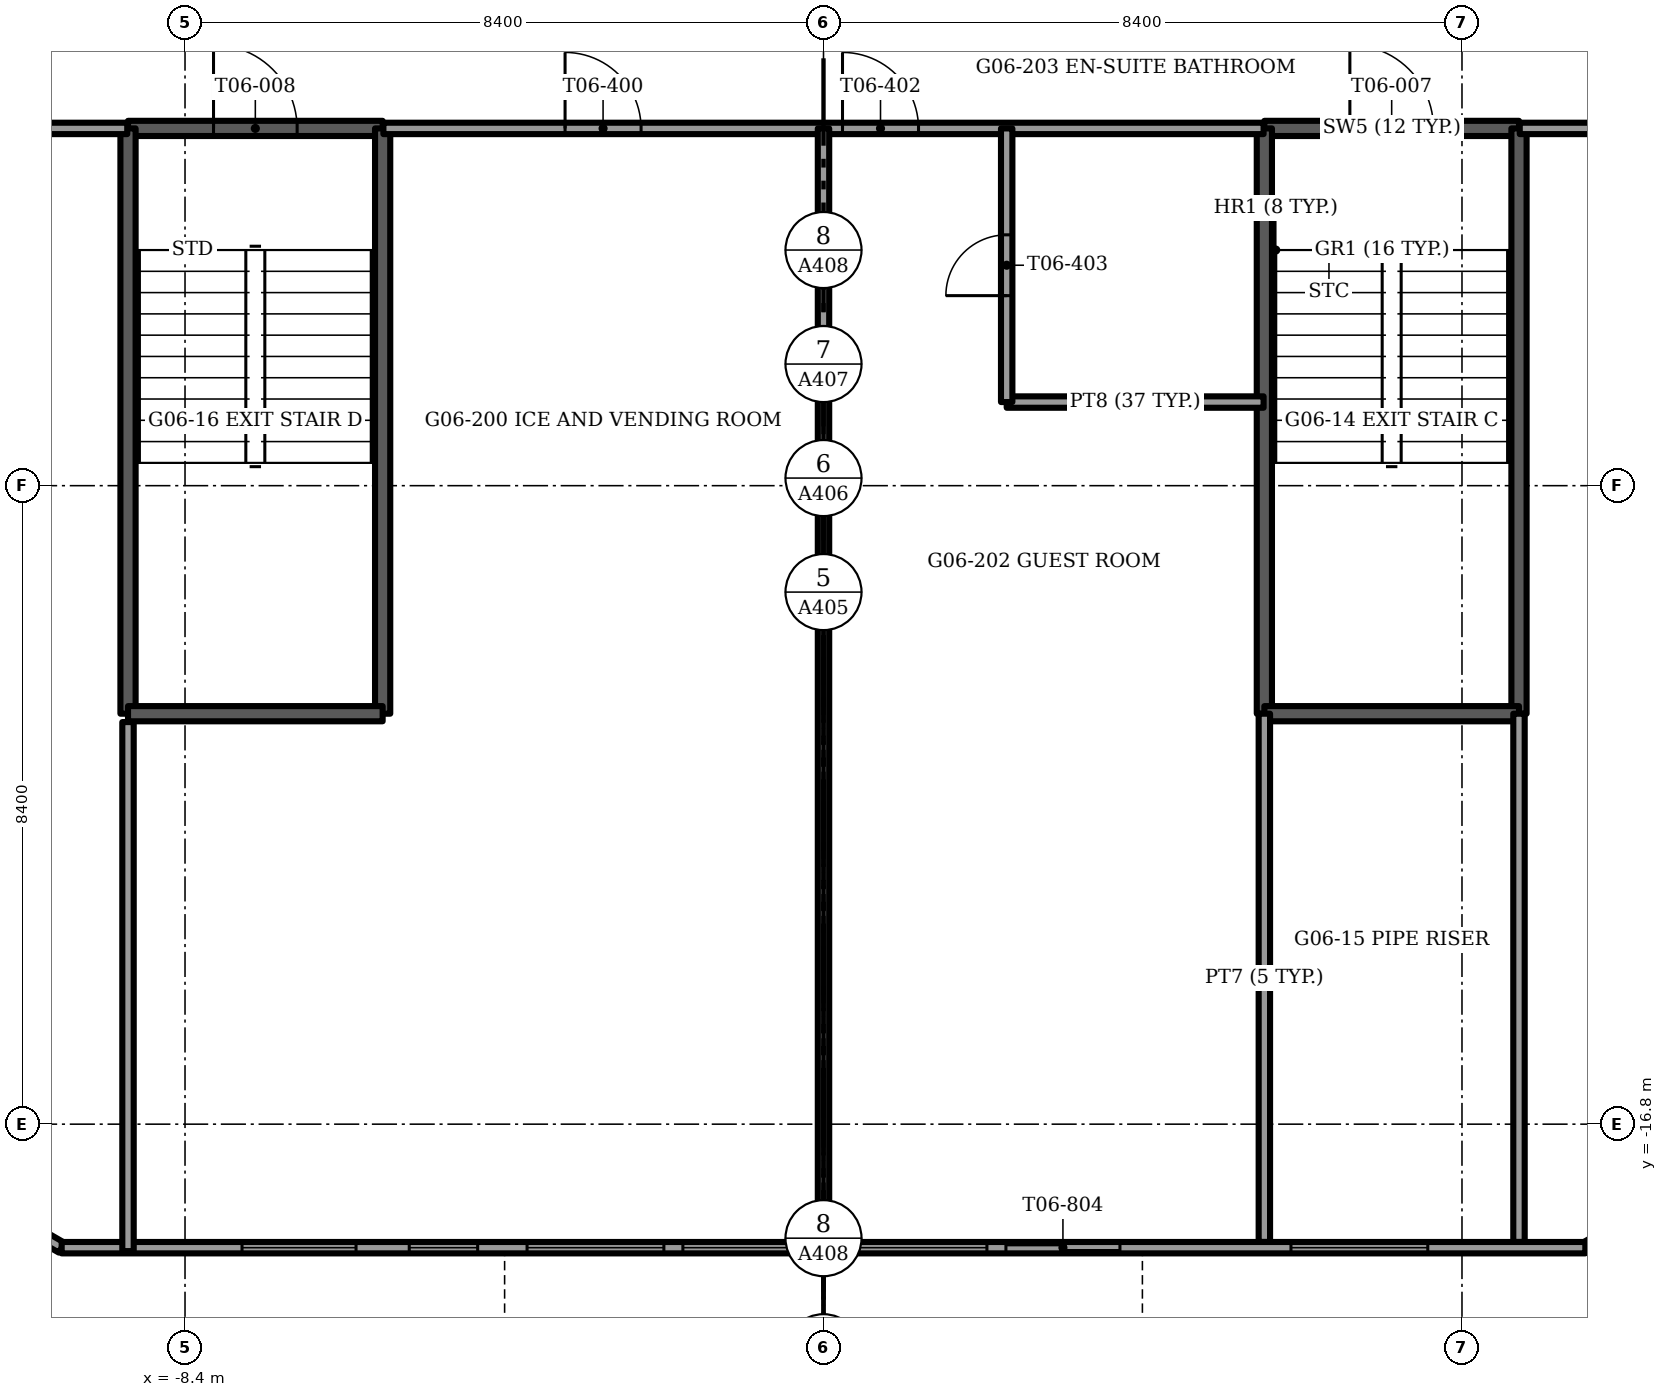
"""IFC4 building model, lengths in metres.
Left out: names, types, materials, properties, quantities, classifications, styles, units other than length and angle.
Written with IfcOpenShell. Run it as: python <this file> out.ifc"""

import sys

from ifc_helpers import new_model, si_unit, direction, frame, frame_2d, origin, place, context, subcontext, project, spatial, rectangle, extrude, element, fill, save


model = new_model("IFC4")
c1 = context("Model", 3, precision=1e-05, world=origin(), true_north=direction((0.0, 1.0)))
c2 = subcontext(c1, "Body", "Model", "MODEL_VIEW")
j1 = project(units=[si_unit("LENGTHUNIT", "METRE"), si_unit("PLANEANGLEUNIT", "RADIAN")], contexts=[c1])
p1 = place(None, origin())
s1 = spatial("IfcSite", under=j1, at=p1, CompositionType="ELEMENT")
p2 = place(p1, origin())
s2 = spatial("IfcBuilding", under=s1, at=p2, CompositionType="ELEMENT")
p3 = place(p2, frame((0.0, 0.0, 28.0)))
s3 = spatial("IfcBuildingStorey", under=s2, at=p3, CompositionType="ELEMENT", Elevation=28.0)
p4 = place(p3, frame((-10.023, -18.425, 0.0), z_axis=(0.0, 0.0, 1.0), x_axis=(1.0, 0.0, 0.0)))
e1 = element("IfcWall", 1, at=p4, inside=s3, PredefinedType="SOLIDWALL", context=c2, shape_type="SweptSolid", body=[
    extrude(rectangle(XDim=20.045, YDim=0.15, at=frame_2d((10.023, 0.0))), origin(), (0.0, 0.0, 1.0), 3.45),
])
p5 = place(p4, frame((4.573, 0.0, 0.15)))
e2 = element("IfcOpeningElement", 2, at=p5, cuts=e1, PredefinedType="OPENING", context=c2, shape_type="SweptSolid", body=[
    extrude(rectangle(XDim=0.9, YDim=2.85, at=frame_2d((0.45, 1.425))), frame((0.0, 0.075, 0.0), z_axis=(0.0, -1.0, 0.0), x_axis=(1.0, 0.0, 0.0)), (0.0, 0.0, 1.0), 0.15),
])
p6 = place(p4, frame((2.373, 0.0, 0.15)))
e3 = element("IfcOpeningElement", 3, at=p6, cuts=e1, PredefinedType="OPENING", context=c2, shape_type="SweptSolid", body=[
    extrude(rectangle(XDim=1.5, YDim=2.85, at=frame_2d((0.75, 1.425))), frame((0.0, 0.075, 0.0), z_axis=(0.0, -1.0, 0.0), x_axis=(1.0, 0.0, 0.0)), (0.0, 0.0, 1.0), 0.15),
])
p7 = place(p4, frame((6.123, 0.0, 0.15)))
e4 = element("IfcOpeningElement", 4, at=p7, cuts=e1, PredefinedType="OPENING", context=c2, shape_type="SweptSolid", body=[
    extrude(rectangle(XDim=1.8, YDim=2.85, at=frame_2d((0.9, 1.425))), frame((0.0, 0.075, 0.0), z_axis=(0.0, -1.0, 0.0), x_axis=(1.0, 0.0, 0.0)), (0.0, 0.0, 1.0), 0.15),
])
p8 = place(p4, frame((8.173, 0.0, 0.15)))
e5 = element("IfcOpeningElement", 5, at=p8, cuts=e1, PredefinedType="OPENING", context=c2, shape_type="SweptSolid", body=[
    extrude(rectangle(XDim=1.5, YDim=2.85, at=frame_2d((0.75, 1.425))), frame((0.0, 0.075, 0.0), z_axis=(0.0, -1.0, 0.0), x_axis=(1.0, 0.0, 0.0)), (0.0, 0.0, 1.0), 0.15),
])
p9 = place(p4, frame((10.373, 0.0, 0.15)))
e6 = element("IfcOpeningElement", 6, at=p9, cuts=e1, PredefinedType="OPENING", context=c2, shape_type="SweptSolid", body=[
    extrude(rectangle(XDim=1.8, YDim=2.85, at=frame_2d((0.9, 1.425))), frame((0.0, 0.075, 0.0), z_axis=(0.0, -1.0, 0.0), x_axis=(1.0, 0.0, 0.0)), (0.0, 0.0, 1.0), 0.15),
])
p10 = place(p4, frame((12.423, 0.0, 0.0)))
e7 = element("IfcOpeningElement", 7, at=p10, cuts=e1, PredefinedType="OPENING", context=c2, shape_type="SweptSolid", body=[
    extrude(rectangle(XDim=1.5, YDim=2.4, at=frame_2d((0.75, 1.2))), frame((0.0, 0.075, 0.0), z_axis=(0.0, -1.0, 0.0), x_axis=(1.0, 0.0, 0.0)), (0.0, 0.0, 1.0), 0.15),
])
p11 = place(p4, frame((16.173, 0.0, 0.15)))
e8 = element("IfcOpeningElement", 8, at=p11, cuts=e1, PredefinedType="OPENING", context=c2, shape_type="SweptSolid", body=[
    extrude(rectangle(XDim=1.8, YDim=2.85, at=frame_2d((0.9, 1.425))), frame((0.0, 0.075, 0.0), z_axis=(0.0, -1.0, 0.0), x_axis=(1.0, 0.0, 0.0)), (0.0, 0.0, 1.0), 0.15),
])
p12 = place(p3, frame((-10.945, -17.893, 0.0), z_axis=(0.0, 0.0, 1.0), x_axis=(0.866048165231, -0.499960573946, 0.0)))
e9 = element("IfcWall", 9, at=p12, inside=s3, PredefinedType="SOLIDWALL", context=c2, shape_type="SweptSolid", body=[
    extrude(rectangle(XDim=1.065, YDim=0.15, at=frame_2d((0.532, 0.0))), origin(), (0.0, 0.0, 1.0), 3.45),
])
p13 = place(p12, frame((0.258, 0.0, 0.15)))
e10 = element("IfcOpeningElement", 10, at=p13, cuts=e9, PredefinedType="OPENING", context=c2, shape_type="SweptSolid", body=[
    extrude(rectangle(XDim=0.55, YDim=2.85, at=frame_2d((0.275, 1.425))), frame((0.0, 0.075, 0.0), z_axis=(0.0, -1.0, 0.0), x_axis=(1.0, 0.0, 0.0)), (0.0, 0.0, 1.0), 0.15),
])
p14 = place(p3, frame((10.023, -18.425, 0.0), z_axis=(0.0, 0.0, 1.0), x_axis=(0.866048165231, 0.499960573946, 0.0)))
e11 = element("IfcWall", 11, at=p14, inside=s3, PredefinedType="SOLIDWALL", context=c2, shape_type="SweptSolid", body=[
    extrude(rectangle(XDim=1.065, YDim=0.15, at=frame_2d((0.532, 0.0))), origin(), (0.0, 0.0, 1.0), 3.45),
])
p15 = place(p14, frame((0.258, 0.0, 0.15)))
e12 = element("IfcOpeningElement", 12, at=p15, cuts=e11, PredefinedType="OPENING", context=c2, shape_type="SweptSolid", body=[
    extrude(rectangle(XDim=0.55, YDim=2.85, at=frame_2d((0.275, 1.425))), frame((0.0, 0.075, 0.0), z_axis=(0.0, -1.0, 0.0), x_axis=(1.0, 0.0, 0.0)), (0.0, 0.0, 1.0), 0.15),
])
p16 = place(p3, frame((5.8, -3.7, -0.3), z_axis=(0.0, 0.0, 1.0), x_axis=(1.0, 0.0, 0.0)))
e13 = element("IfcWall", 13, at=p16, inside=s3, PredefinedType="SOLIDWALL", context=c2, shape_type="SweptSolid", body=[
    extrude(rectangle(XDim=3.35, YDim=0.2, at=frame_2d((1.675, 0.0))), origin(), (0.0, 0.0, 1.0), 3.75),
])
p17 = place(p16, frame((1.125, 0.0, 0.0)))
e14 = element("IfcOpeningElement", 14, at=p17, cuts=e13, PredefinedType="OPENING", context=c2, shape_type="SweptSolid", body=[
    extrude(rectangle(XDim=1.1, YDim=2.1, at=frame_2d((0.55, 1.05))), frame((0.0, 0.1, 0.0), z_axis=(0.0, -1.0, 0.0), x_axis=(1.0, 0.0, 0.0)), (0.0, 0.0, 1.0), 0.2),
])
for number, where, z_axis, x_axis in (
    (15, (5.8, -3.7, -0.3), (0.0, 0.0, 1.0), (0.0, -1.0, 0.0)),
    (16, (9.15, -3.7, -0.3), (0.0, 0.0, 1.0), (0.0, -1.0, 0.0)),
):
    element("IfcWall", number, at=place(p3, frame(where, z_axis=z_axis, x_axis=x_axis)), inside=s3, PredefinedType="SOLIDWALL", context=c2, shape_type="SweptSolid", body=[
        extrude(rectangle(XDim=7.7, YDim=0.2, at=frame_2d((3.85, 0.0))), origin(), (0.0, 0.0, 1.0), 3.75),
    ])
p18 = place(p3, frame((5.8, -11.4, -0.3), z_axis=(0.0, 0.0, 1.0), x_axis=(1.0, 0.0, 0.0)))
e17 = element("IfcWall", 17, at=p18, inside=s3, PredefinedType="SOLIDWALL", context=c2, shape_type="SweptSolid", body=[
    extrude(rectangle(XDim=3.35, YDim=0.2, at=frame_2d((1.675, 0.0))), origin(), (0.0, 0.0, 1.0), 3.75),
])
for number, where, z_axis, x_axis in (
    (18, (5.8, -11.4, 0.0), (0.0, 0.0, 1.0), (0.0, -1.0, 0.0)),
    (19, (9.15, -11.4, 0.0), (0.0, 0.0, 1.0), (0.0, -1.0, 0.0)),
):
    element("IfcWall", number, at=place(p3, frame(where, z_axis=z_axis, x_axis=x_axis)), inside=s3, PredefinedType="PARTITIONING", context=c2, shape_type="SweptSolid", body=[
        extrude(rectangle(XDim=6.95, YDim=0.15, at=frame_2d((3.475, 0.0))), origin(), (0.0, 0.0, 1.0), 3.45),
    ])
p19 = place(p3, frame((-9.15, -3.7, -0.3), z_axis=(0.0, 0.0, 1.0), x_axis=(1.0, 0.0, 0.0)))
e20 = element("IfcWall", 20, at=p19, inside=s3, PredefinedType="SOLIDWALL", context=c2, shape_type="SweptSolid", body=[
    extrude(rectangle(XDim=3.35, YDim=0.2, at=frame_2d((1.675, 0.0))), origin(), (0.0, 0.0, 1.0), 3.75),
])
p20 = place(p19, frame((1.125, 0.0, 0.0)))
e21 = element("IfcOpeningElement", 21, at=p20, cuts=e20, PredefinedType="OPENING", context=c2, shape_type="SweptSolid", body=[
    extrude(rectangle(XDim=1.1, YDim=2.1, at=frame_2d((0.55, 1.05))), frame((0.0, 0.1, 0.0), z_axis=(0.0, -1.0, 0.0), x_axis=(1.0, 0.0, 0.0)), (0.0, 0.0, 1.0), 0.2),
])
for number, where, z_axis, x_axis in (
    (22, (-9.15, -3.7, -0.3), (0.0, 0.0, 1.0), (0.0, -1.0, 0.0)),
    (23, (-5.8, -3.7, -0.3), (0.0, 0.0, 1.0), (0.0, -1.0, 0.0)),
):
    element("IfcWall", number, at=place(p3, frame(where, z_axis=z_axis, x_axis=x_axis)), inside=s3, PredefinedType="SOLIDWALL", context=c2, shape_type="SweptSolid", body=[
        extrude(rectangle(XDim=7.7, YDim=0.2, at=frame_2d((3.85, 0.0))), origin(), (0.0, 0.0, 1.0), 3.75),
    ])
p21 = place(p3, frame((-9.15, -11.4, -0.3), z_axis=(0.0, 0.0, 1.0), x_axis=(1.0, 0.0, 0.0)))
e24 = element("IfcWall", 24, at=p21, inside=s3, PredefinedType="SOLIDWALL", context=c2, shape_type="SweptSolid", body=[
    extrude(rectangle(XDim=3.35, YDim=0.2, at=frame_2d((1.675, 0.0))), origin(), (0.0, 0.0, 1.0), 3.75),
])
p22 = place(p3, frame((2.41, -7.3, 0.0), z_axis=(0.0, 0.0, 1.0), x_axis=(1.0, 0.0, 0.0)))
e25 = element("IfcWall", 25, at=p22, inside=s3, PredefinedType="PARTITIONING", context=c2, shape_type="SweptSolid", body=[
    extrude(rectangle(XDim=3.38, YDim=0.15, at=frame_2d((1.69, 0.0))), origin(), (0.0, 0.0, 1.0), 3.45),
])
p23 = place(p3, frame((-19.191, -3.7, 0.0), z_axis=(0.0, 0.0, 1.0), x_axis=(1.0, 0.0, 0.0)))
e26 = element("IfcWall", 26, at=p23, inside=s3, PredefinedType="PARTITIONING", context=c2, shape_type="SweptSolid", body=[
    extrude(rectangle(XDim=10.031, YDim=0.15, at=frame_2d((5.016, 0.0))), origin(), (0.0, 0.0, 1.0), 3.45),
])
p24 = place(p23, frame((7.191, 0.0, 0.0)))
e27 = element("IfcOpeningElement", 27, at=p24, cuts=e26, PredefinedType="OPENING", context=c2, shape_type="SweptSolid", body=[
    extrude(rectangle(XDim=1.0, YDim=2.1, at=frame_2d((0.5, 1.05))), frame((0.0, 0.075, 0.0), z_axis=(0.0, -1.0, 0.0), x_axis=(1.0, 0.0, 0.0)), (0.0, 0.0, 1.0), 0.15),
])
p25 = place(p3, frame((-5.79, -3.7, 0.0), z_axis=(0.0, 0.0, 1.0), x_axis=(1.0, 0.0, 0.0)))
e28 = element("IfcWall", 28, at=p25, inside=s3, PredefinedType="PARTITIONING", context=c2, shape_type="SweptSolid", body=[
    extrude(rectangle(XDim=11.58, YDim=0.15, at=frame_2d((5.79, 0.0))), origin(), (0.0, 0.0, 1.0), 3.45),
])
p26 = place(p25, frame((2.39, 0.0, 0.0)))
e29 = element("IfcOpeningElement", 29, at=p26, cuts=e28, PredefinedType="OPENING", context=c2, shape_type="SweptSolid", body=[
    extrude(rectangle(XDim=1.0, YDim=2.1, at=frame_2d((0.5, 1.05))), frame((0.0, 0.075, 0.0), z_axis=(0.0, -1.0, 0.0), x_axis=(1.0, 0.0, 0.0)), (0.0, 0.0, 1.0), 0.15),
])
p27 = place(p25, frame((6.04, 0.0, 0.0)))
e30 = element("IfcOpeningElement", 30, at=p27, cuts=e28, PredefinedType="OPENING", context=c2, shape_type="SweptSolid", body=[
    extrude(rectangle(XDim=1.0, YDim=2.1, at=frame_2d((0.5, 1.05))), frame((0.0, 0.075, 0.0), z_axis=(0.0, -1.0, 0.0), x_axis=(1.0, 0.0, 0.0)), (0.0, 0.0, 1.0), 0.15),
])
p28 = place(p3, frame((9.16, -3.7, 0.0), z_axis=(0.0, 0.0, 1.0), x_axis=(1.0, 0.0, 0.0)))
e31 = element("IfcWall", 31, at=p28, inside=s3, PredefinedType="PARTITIONING", context=c2, shape_type="SweptSolid", body=[
    extrude(rectangle(XDim=10.031, YDim=0.15, at=frame_2d((5.016, 0.0))), origin(), (0.0, 0.0, 1.0), 3.45),
])
p29 = place(p28, frame((1.84, 0.0, 0.0)))
e32 = element("IfcOpeningElement", 32, at=p29, cuts=e31, PredefinedType="OPENING", context=c2, shape_type="SweptSolid", body=[
    extrude(rectangle(XDim=1.0, YDim=2.1, at=frame_2d((0.5, 1.05))), frame((0.0, 0.075, 0.0), z_axis=(0.0, -1.0, 0.0), x_axis=(1.0, 0.0, 0.0)), (0.0, 0.0, 1.0), 0.15),
])
p30 = place(p3, frame((2.41, -7.3, 0.0), z_axis=(0.0, 0.0, 1.0), x_axis=(0.0, 1.0, 0.0)))
e33 = element("IfcWall", 33, at=p30, inside=s3, PredefinedType="PARTITIONING", context=c2, shape_type="SweptSolid", body=[
    extrude(rectangle(XDim=3.6, YDim=0.15, at=frame_2d((1.8, 0.0))), origin(), (0.0, 0.0, 1.0), 3.45),
])
p31 = place(p30, frame((1.4, 0.0, 0.0)))
e34 = element("IfcOpeningElement", 34, at=p31, cuts=e33, PredefinedType="OPENING", context=c2, shape_type="SweptSolid", body=[
    extrude(rectangle(XDim=0.8, YDim=2.1, at=frame_2d((0.4, 1.05))), frame((0.0, 0.075, 0.0), z_axis=(0.0, -1.0, 0.0), x_axis=(1.0, 0.0, 0.0)), (0.0, 0.0, 1.0), 0.15),
])
p32 = place(p3, frame((0.0, -18.47, 0.0), z_axis=(0.0, 0.0, 1.0), x_axis=(0.0, 1.0, 0.0)))
e35 = element("IfcWall", 35, at=p32, inside=s3, PredefinedType="PARTITIONING", context=c2, shape_type="SweptSolid", body=[
    extrude(rectangle(XDim=14.77, YDim=0.15, at=frame_2d((7.385, 0.0))), origin(), (0.0, 0.0, 1.0), 3.45),
])
p33 = place(p3, frame((-9.15, -18.47, 0.0), z_axis=(0.0, 0.0, 1.0), x_axis=(0.0, 1.0, 0.0)))
e36 = element("IfcWall", 36, at=p33, inside=s3, PredefinedType="PARTITIONING", context=c2, shape_type="SweptSolid", body=[
    extrude(rectangle(XDim=6.96, YDim=0.15, at=frame_2d((3.48, 0.0))), origin(), (0.0, 0.0, 1.0), 3.45),
])
p34 = place(p5, origin())
e37 = element("IfcWindow", 37, at=p34, inside=s3, PartitioningType="SINGLE_PANEL", PredefinedType="WINDOW", context=c2, shape_type="SweptSolid", body=[
    extrude(rectangle(XDim=0.9, YDim=2.85, at=frame_2d((0.45, 1.425))), frame((0.0, 0.03, 0.0), z_axis=(0.0, -1.0, 0.0), x_axis=(1.0, 0.0, 0.0)), (0.0, 0.0, 1.0), 0.06),
])
fill(e2, e37)
p35 = place(p6, origin())
e38 = element("IfcWindow", 38, at=p35, inside=s3, PartitioningType="SINGLE_PANEL", PredefinedType="WINDOW", context=c2, shape_type="SweptSolid", body=[
    extrude(rectangle(XDim=1.5, YDim=2.85, at=frame_2d((0.75, 1.425))), frame((0.0, 0.03, 0.0), z_axis=(0.0, -1.0, 0.0), x_axis=(1.0, 0.0, 0.0)), (0.0, 0.0, 1.0), 0.06),
])
fill(e3, e38)
p36 = place(p7, origin())
e39 = element("IfcWindow", 39, at=p36, inside=s3, PartitioningType="SINGLE_PANEL", PredefinedType="WINDOW", context=c2, shape_type="SweptSolid", body=[
    extrude(rectangle(XDim=1.8, YDim=2.85, at=frame_2d((0.9, 1.425))), frame((0.0, 0.03, 0.0), z_axis=(0.0, -1.0, 0.0), x_axis=(1.0, 0.0, 0.0)), (0.0, 0.0, 1.0), 0.06),
])
fill(e4, e39)
p37 = place(p8, origin())
e40 = element("IfcWindow", 40, at=p37, inside=s3, PartitioningType="SINGLE_PANEL", PredefinedType="WINDOW", context=c2, shape_type="SweptSolid", body=[
    extrude(rectangle(XDim=1.5, YDim=2.85, at=frame_2d((0.75, 1.425))), frame((0.0, 0.03, 0.0), z_axis=(0.0, -1.0, 0.0), x_axis=(1.0, 0.0, 0.0)), (0.0, 0.0, 1.0), 0.06),
])
fill(e5, e40)
p38 = place(p9, origin())
e41 = element("IfcWindow", 41, at=p38, inside=s3, PartitioningType="SINGLE_PANEL", PredefinedType="WINDOW", context=c2, shape_type="SweptSolid", body=[
    extrude(rectangle(XDim=1.8, YDim=2.85, at=frame_2d((0.9, 1.425))), frame((0.0, 0.03, 0.0), z_axis=(0.0, -1.0, 0.0), x_axis=(1.0, 0.0, 0.0)), (0.0, 0.0, 1.0), 0.06),
])
fill(e6, e41)
p39 = place(p10, origin())
e42 = element("IfcDoor", 42, at=p39, inside=s3, OperationType="SLIDING_TO_LEFT", PredefinedType="DOOR", context=c2, shape_type="SweptSolid", body=[
    extrude(rectangle(XDim=1.5, YDim=2.4, at=frame_2d((0.75, 1.2))), frame((0.0, 0.025, 0.0), z_axis=(0.0, -1.0, 0.0), x_axis=(1.0, 0.0, 0.0)), (0.0, 0.0, 1.0), 0.05),
])
fill(e7, e42)
p40 = place(p11, origin())
e43 = element("IfcWindow", 43, at=p40, inside=s3, PartitioningType="SINGLE_PANEL", PredefinedType="WINDOW", context=c2, shape_type="SweptSolid", body=[
    extrude(rectangle(XDim=1.8, YDim=2.85, at=frame_2d((0.9, 1.425))), frame((0.0, 0.03, 0.0), z_axis=(0.0, -1.0, 0.0), x_axis=(1.0, 0.0, 0.0)), (0.0, 0.0, 1.0), 0.06),
])
fill(e8, e43)
p41 = place(p17, origin())
e44 = element("IfcDoor", 44, at=p41, inside=s3, OperationType="SINGLE_SWING_LEFT", PredefinedType="DOOR", context=c2, shape_type="SweptSolid", body=[
    extrude(rectangle(XDim=1.1, YDim=2.1, at=frame_2d((0.55, 1.05))), frame((0.0, 0.025, 0.0), z_axis=(0.0, -1.0, 0.0), x_axis=(1.0, 0.0, 0.0)), (0.0, 0.0, 1.0), 0.05),
])
fill(e14, e44)
p42 = place(p20, origin())
e45 = element("IfcDoor", 45, at=p42, inside=s3, OperationType="SINGLE_SWING_LEFT", PredefinedType="DOOR", context=c2, shape_type="SweptSolid", body=[
    extrude(rectangle(XDim=1.1, YDim=2.1, at=frame_2d((0.55, 1.05))), frame((0.0, 0.025, 0.0), z_axis=(0.0, -1.0, 0.0), x_axis=(1.0, 0.0, 0.0)), (0.0, 0.0, 1.0), 0.05),
])
fill(e21, e45)
p43 = place(p26, origin())
e46 = element("IfcDoor", 46, at=p43, inside=s3, OperationType="SINGLE_SWING_RIGHT", PredefinedType="DOOR", context=c2, shape_type="SweptSolid", body=[
    extrude(rectangle(XDim=1.0, YDim=2.1, at=frame_2d((0.5, 1.05))), frame((0.0, 0.025, 0.0), z_axis=(0.0, -1.0, 0.0), x_axis=(1.0, 0.0, 0.0)), (0.0, 0.0, 1.0), 0.05),
])
fill(e29, e46)
p44 = place(p27, origin())
e47 = element("IfcDoor", 47, at=p44, inside=s3, OperationType="SINGLE_SWING_LEFT", PredefinedType="DOOR", context=c2, shape_type="SweptSolid", body=[
    extrude(rectangle(XDim=1.0, YDim=2.1, at=frame_2d((0.5, 1.05))), frame((0.0, 0.025, 0.0), z_axis=(0.0, -1.0, 0.0), x_axis=(1.0, 0.0, 0.0)), (0.0, 0.0, 1.0), 0.05),
])
fill(e30, e47)
p45 = place(p31, origin())
e48 = element("IfcDoor", 48, at=p45, inside=s3, OperationType="SINGLE_SWING_RIGHT", PredefinedType="DOOR", context=c2, shape_type="SweptSolid", body=[
    extrude(rectangle(XDim=0.8, YDim=2.1, at=frame_2d((0.4, 1.05))), frame((0.0, 0.025, 0.0), z_axis=(0.0, -1.0, 0.0), x_axis=(1.0, 0.0, 0.0)), (0.0, 0.0, 1.0), 0.05),
])
fill(e34, e48)
save(model, sys.argv[1])
